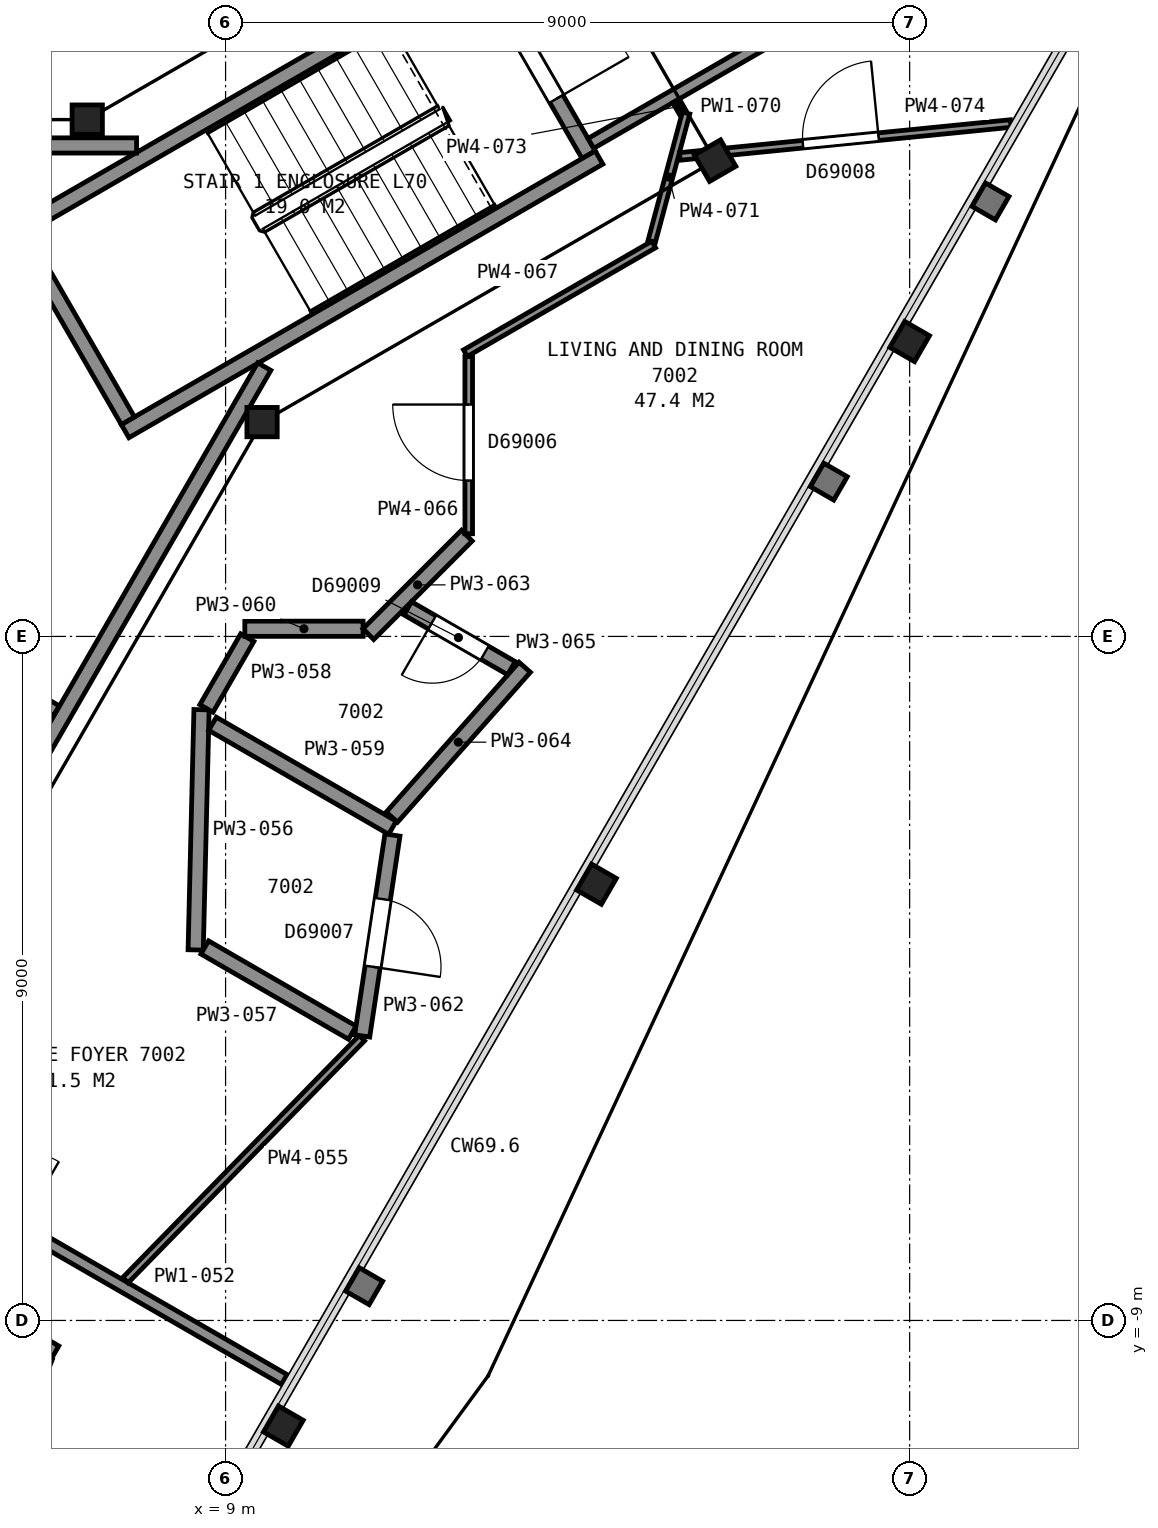
"""IFC4 building model, lengths in metres.
Left out: names, types, materials, properties, quantities, classifications, styles, units other than length and angle.
Written with IfcOpenShell. Run it as: python <this file> out.ifc"""

import sys

from ifc_helpers import new_model, si_unit, direction, frame, frame_2d, origin, origin_2d, place, context, subcontext, project, spatial, rectangle, i_section, extrude, element, fill, save


model = new_model("IFC4")
c1 = context("Model", 3, precision=1e-05, world=origin(), true_north=direction((0.0, 1.0)))
c2 = subcontext(c1, "Body", "Model", "MODEL_VIEW")
j1 = project(units=[si_unit("LENGTHUNIT", "METRE"), si_unit("PLANEANGLEUNIT", "RADIAN")], contexts=[c1])
p1 = place(None, origin())
s1 = spatial("IfcSite", under=j1, at=p1, CompositionType="ELEMENT")
p2 = place(p1, origin())
s2 = spatial("IfcBuilding", under=s1, at=p2, CompositionType="ELEMENT")
p3 = place(p2, frame((0.0, 0.0, 278.8)))
s3 = spatial("IfcBuildingStorey", under=s2, at=p3, CompositionType="ELEMENT", Elevation=278.8)
for number, where, z_axis, x_axis in (
    (1, (9.76, -10.39, 0.0), (0.0, 0.0, 1.0), (-0.5, -0.866, 0.0)),
    (2, (13.88, -3.26, 0.0), (0.0, 0.0, 1.0), (-0.5, -0.866, 0.0)),
    (3, (18.0, 3.88, 0.0), (0.0, 0.0, 1.0), (-0.5, -0.866, 0.0)),
):
    element("IfcColumn", number, at=place(p3, frame(where, z_axis=z_axis, x_axis=x_axis)), inside=s3, PredefinedType="COLUMN", context=c2, shape_type="SweptSolid", body=[
        extrude(i_section(OverallWidth=0.394, OverallDepth=0.376, WebThickness=0.017, FlangeThickness=0.028, FilletRadius=0.015, at=origin_2d()), origin(), (0.0, 0.0, 1.0), 3.7),
    ])
p4 = place(p3, frame((9.48, 2.82, 0.0), z_axis=(0.0, 0.0, 1.0), x_axis=(1.0, 0.0, 0.0)))
e4 = element("IfcColumn", 4, at=p4, inside=s3, PredefinedType="COLUMN", context=c2, shape_type="SweptSolid", body=[
    extrude(i_section(OverallWidth=0.399, OverallDepth=0.386, WebThickness=0.021, FlangeThickness=0.033, FilletRadius=0.015, at=origin_2d()), origin(), (0.0, 0.0, 1.0), 3.7),
])
p5 = place(p3, frame((15.44, 6.26, 0.0), z_axis=(0.0, 0.0, 1.0), x_axis=(0.5, -0.866025403784, 0.0)))
e5 = element("IfcColumn", 5, at=p5, inside=s3, PredefinedType="COLUMN", context=c2, shape_type="SweptSolid", body=[
    extrude(i_section(OverallWidth=0.401, OverallDepth=0.399, WebThickness=0.025, FlangeThickness=0.04, FilletRadius=0.015, at=origin_2d()), origin(), (0.0, 0.0, 1.0), 3.7),
])
p6 = place(p3, frame((7.18, 6.8, 0.0), z_axis=(0.0, 0.0, 1.0), x_axis=(1.0, 0.0, 0.0)))
e6 = element("IfcColumn", 6, at=p6, inside=s3, PredefinedType="COLUMN", context=c2, shape_type="SweptSolid", body=[
    extrude(i_section(OverallWidth=0.399, OverallDepth=0.386, WebThickness=0.021, FlangeThickness=0.033, FilletRadius=0.015, at=origin_2d()), origin(), (0.0, 0.0, 1.0), 3.7),
])
p7 = place(p3, frame((13.777, 6.338, 0.0), z_axis=(0.0, 0.0, 1.0), x_axis=(-0.500049511043, 0.865996816683, 0.0)))
e7 = element("IfcWall", 7, at=p7, inside=s3, PredefinedType="PARTITIONING", context=c2, shape_type="SweptSolid", body=[
    extrude(rectangle(XDim=2.8, YDim=0.2, at=frame_2d((1.4, 0.0))), origin(), (0.0, 0.0, 1.0), 3.45),
])
p8 = place(p7, frame((0.85, 0.0, 0.0)))
e8 = element("IfcOpeningElement", 8, at=p8, cuts=e7, PredefinedType="OPENING", context=c2, shape_type="SweptSolid", body=[
    extrude(rectangle(XDim=1.1, YDim=2.1, at=frame_2d((0.55, 1.05))), frame((0.0, 0.11, 0.0), z_axis=(0.0, -1.0, 0.0), x_axis=(1.0, 0.0, 0.0)), (0.0, 0.0, 1.0), 0.22),
])
for number, where, z_axis, x_axis in (
    (9, (6.178, 5.299, 0.0), (0.0, 0.0, 1.0), (0.866, 0.5, 0.0)),
    (10, (7.678, 2.701, 0.0), (0.0, 0.0, 1.0), (0.866, 0.5, 0.0)),
):
    element("IfcWall", number, at=place(p3, frame(where, z_axis=z_axis, x_axis=x_axis)), inside=s3, PredefinedType="PARTITIONING", context=c2, shape_type="SweptSolid", body=[
        extrude(rectangle(XDim=7.2, YDim=0.2, at=frame_2d((3.6, 0.0))), origin(), (0.0, 0.0, 1.0), 3.45),
    ])
p9 = place(p3, frame((7.715, 2.838, 0.0), z_axis=(0.0, 0.0, 1.0), x_axis=(-0.500049511043, 0.865996816683, 0.0)))
e11 = element("IfcWall", 11, at=p9, inside=s3, PredefinedType="PARTITIONING", context=c2, shape_type="SweptSolid", body=[
    extrude(rectangle(XDim=2.8, YDim=0.2, at=frame_2d((1.4, 0.0))), origin(), (0.0, 0.0, 1.0), 3.45),
])
p10 = place(p3, frame((7.829, 6.46, 0.0), z_axis=(0.0, 0.0, 1.0), x_axis=(-1.0, 0.0, 0.0)))
e12 = element("IfcWall", 12, at=p10, inside=s3, PredefinedType="PARTITIONING", context=c2, shape_type="SweptSolid", body=[
    extrude(rectangle(XDim=15.658, YDim=0.2, at=frame_2d((7.829, 0.0))), origin(), (0.0, 0.0, 1.0), 3.45),
])
p11 = place(p10, frame((12.168, 0.0, 0.0)))
e13 = element("IfcOpeningElement", 13, at=p11, cuts=e12, PredefinedType="OPENING", context=c2, shape_type="SweptSolid", body=[
    extrude(rectangle(XDim=1.2, YDim=2.1, at=frame_2d((0.6, 1.05))), frame((0.0, 0.11, 0.0), z_axis=(0.0, -1.0, 0.0), x_axis=(1.0, 0.0, 0.0)), (0.0, 0.0, 1.0), 0.22),
])
p12 = place(p3, frame((3.828, -6.29, 0.0), z_axis=(0.0, 0.0, 1.0), x_axis=(0.499979739078, 0.866037101117, 0.0)))
e14 = element("IfcWall", 14, at=p12, inside=s3, PredefinedType="PARTITIONING", context=c2, shape_type="SweptSolid", body=[
    extrude(rectangle(XDim=11.363, YDim=0.2, at=frame_2d((5.681, 0.0))), origin(), (0.0, 0.0, 1.0), 3.45),
])
p13 = place(p12, frame((0.55, 0.0, 0.0)))
e15 = element("IfcOpeningElement", 15, at=p13, cuts=e14, PredefinedType="OPENING", context=c2, shape_type="SweptSolid", body=[
    extrude(rectangle(XDim=1.2, YDim=2.1, at=frame_2d((0.6, 1.05))), frame((0.0, 0.11, 0.0), z_axis=(0.0, -1.0, 0.0), x_axis=(1.0, 0.0, 0.0)), (0.0, 0.0, 1.0), 0.22),
])
p14 = place(p3, frame((6.774, -0.978, 0.0), z_axis=(0.0, 0.0, 1.0), x_axis=(-0.866062920605, 0.499935013329, 0.0)))
e16 = element("IfcWall", 16, at=p14, inside=s3, PredefinedType="PARTITIONING", context=c2, shape_type="SweptSolid", body=[
    extrude(rectangle(XDim=2.22, YDim=0.15, at=frame_2d((1.11, 0.0))), origin(), (0.0, 0.0, 1.0), 3.45),
])
p15 = place(p14, frame((0.646, 0.0, 0.0)))
e17 = element("IfcOpeningElement", 17, at=p15, cuts=e16, PredefinedType="OPENING", context=c2, shape_type="SweptSolid", body=[
    extrude(rectangle(XDim=0.9, YDim=2.1, at=frame_2d((0.45, 1.05))), frame((0.0, 0.085, 0.0), z_axis=(0.0, -1.0, 0.0), x_axis=(1.0, 0.0, 0.0)), (0.0, 0.0, 1.0), 0.17),
])
p16 = place(p3, frame((3.498, -7.541, 0.0), z_axis=(0.0, 0.0, 1.0), x_axis=(0.865985624761, -0.500068892961, 0.0)))
e18 = element("IfcWall", 18, at=p16, inside=s3, PredefinedType="PARTITIONING", context=c2, shape_type="SweptSolid", body=[
    extrude(rectangle(XDim=3.762, YDim=0.2, at=frame_2d((1.881, 0.0))), origin(), (0.0, 0.0, 1.0), 2.723),
])
p17 = place(p3, frame((9.772, -9.777, 0.0), z_axis=(0.0, 0.0, 1.0), x_axis=(-0.866083818164, 0.499898809675, 0.0)))
e19 = element("IfcWall", 19, at=p17, inside=s3, PredefinedType="PARTITIONING", context=c2, shape_type="SweptSolid", body=[
    extrude(rectangle(XDim=6.551, YDim=0.15, at=frame_2d((3.275, 0.0))), origin(), (0.0, 0.0, 1.0), 2.723),
])
p18 = place(p17, frame((4.001, 0.0, 0.0)))
e20 = element("IfcOpeningElement", 20, at=p18, cuts=e19, PredefinedType="OPENING", context=c2, shape_type="SweptSolid", body=[
    extrude(rectangle(XDim=1.0, YDim=2.1, at=frame_2d((0.5, 1.05))), frame((0.0, 0.085, 0.0), z_axis=(0.0, -1.0, 0.0), x_axis=(1.0, 0.0, 0.0)), (0.0, 0.0, 1.0), 0.17),
])
p19 = place(p3, frame((5.526, -12.29, 0.0), z_axis=(0.0, 0.0, 1.0), x_axis=(0.364786545928, 0.931091174864, 0.0)))
e21 = element("IfcWall", 21, at=p19, inside=s3, PredefinedType="PARTITIONING", context=c2, shape_type="SweptSolid", body=[
    extrude(rectangle(XDim=3.019, YDim=0.2, at=frame_2d((1.51, 0.0))), origin(), (0.0, 0.0, 1.0), 2.723),
])
p20 = place(p3, frame((7.682, -8.47, 0.0), z_axis=(0.0, 0.0, 1.0), x_axis=(0.698777378461, 0.715339203002, 0.0)))
e22 = element("IfcWall", 22, at=p20, inside=s3, PredefinedType="PARTITIONING", context=c2, shape_type="SweptSolid", body=[
    extrude(rectangle(XDim=4.452, YDim=0.1, at=frame_2d((2.226, 0.0))), origin(), (0.0, 0.0, 1.0), 2.723),
])
p21 = place(p3, frame((8.607, -4.125, 0.0), z_axis=(0.0, 0.0, 1.0), x_axis=(0.024245593124, 0.999706032399, 0.0)))
e23 = element("IfcWall", 23, at=p21, inside=s3, PredefinedType="PARTITIONING", context=c2, shape_type="SweptSolid", body=[
    extrude(rectangle(XDim=3.162, YDim=0.2, at=frame_2d((1.581, 0.0))), origin(), (0.0, 0.0, 1.0), 2.723),
])
p22 = place(p3, frame((8.726, -4.093, 0.0), z_axis=(0.0, 0.0, 1.0), x_axis=(0.866056839033, -0.499945548598, 0.0)))
e24 = element("IfcWall", 24, at=p22, inside=s3, PredefinedType="PARTITIONING", context=c2, shape_type="SweptSolid", body=[
    extrude(rectangle(XDim=2.242, YDim=0.2, at=frame_2d((1.121, 0.0))), origin(), (0.0, 0.0, 1.0), 2.723),
])
p23 = place(p3, frame((8.749, -0.947, 0.0), z_axis=(0.0, 0.0, 1.0), x_axis=(0.499656913366, 0.866223394354, 0.0)))
e25 = element("IfcWall", 25, at=p23, inside=s3, PredefinedType="PARTITIONING", context=c2, shape_type="SweptSolid", body=[
    extrude(rectangle(XDim=1.075, YDim=0.2, at=frame_2d((0.538, 0.0))), origin(), (0.0, 0.0, 1.0), 2.723),
])
p24 = place(p3, frame((8.828, -1.149, 0.0), z_axis=(0.0, 0.0, 1.0), x_axis=(0.865853899269, -0.50029693695, 0.0)))
e26 = element("IfcWall", 26, at=p24, inside=s3, PredefinedType="PARTITIONING", context=c2, shape_type="SweptSolid", body=[
    extrude(rectangle(XDim=2.734, YDim=0.2, at=frame_2d((1.367, 0.0))), origin(), (0.0, 0.0, 1.0), 2.723),
])
p25 = place(p3, frame((9.253, 0.101, 0.0), z_axis=(0.0, 0.0, 1.0), x_axis=(1.0, 0.0, 0.0)))
e27 = element("IfcWall", 27, at=p25, inside=s3, PredefinedType="PARTITIONING", context=c2, shape_type="SweptSolid", body=[
    extrude(rectangle(XDim=1.556, YDim=0.2, at=frame_2d((0.778, 0.0))), origin(), (0.0, 0.0, 1.0), 2.723),
])
p26 = place(p3, frame((10.797, -5.256, 0.0), z_axis=(0.0, 0.0, 1.0), x_axis=(0.148961207986, 0.988843040384, 0.0)))
e28 = element("IfcWall", 28, at=p26, inside=s3, PredefinedType="PARTITIONING", context=c2, shape_type="SweptSolid", body=[
    extrude(rectangle(XDim=2.673, YDim=0.2, at=frame_2d((1.336, 0.0))), origin(), (0.0, 0.0, 1.0), 2.723),
])
p27 = place(p26, frame((0.92, 0.0, 0.0)))
e29 = element("IfcOpeningElement", 29, at=p27, cuts=e28, PredefinedType="OPENING", context=c2, shape_type="SweptSolid", body=[
    extrude(rectangle(XDim=0.9, YDim=2.1, at=frame_2d((0.45, 1.05))), frame((0.0, 0.11, 0.0), z_axis=(0.0, -1.0, 0.0), x_axis=(1.0, 0.0, 0.0)), (0.0, 0.0, 1.0), 0.22),
])
p28 = place(p3, frame((10.878, 0.03, 0.0), z_axis=(0.0, 0.0, 1.0), x_axis=(0.707173379423, 0.707040176677, 0.0)))
e30 = element("IfcWall", 30, at=p28, inside=s3, PredefinedType="PARTITIONING", context=c2, shape_type="SweptSolid", body=[
    extrude(rectangle(XDim=1.833, YDim=0.2, at=frame_2d((0.917, 0.0))), origin(), (0.0, 0.0, 1.0), 2.723),
])
p29 = place(p3, frame((11.188, -2.377, 0.0), z_axis=(0.0, 0.0, 1.0), x_axis=(0.663045631266, 0.748578981043, 0.0)))
e31 = element("IfcWall", 31, at=p29, inside=s3, PredefinedType="PARTITIONING", context=c2, shape_type="SweptSolid", body=[
    extrude(rectangle(XDim=2.635, YDim=0.2, at=frame_2d((1.317, 0.0))), origin(), (0.0, 0.0, 1.0), 2.723),
])
p30 = place(p3, frame((12.761, -0.417, 0.0), z_axis=(0.0, 0.0, 1.0), x_axis=(-0.866030680601, 0.499990860175, 0.0)))
e32 = element("IfcWall", 32, at=p30, inside=s3, PredefinedType="PARTITIONING", context=c2, shape_type="SweptSolid", body=[
    extrude(rectangle(XDim=1.575, YDim=0.2, at=frame_2d((0.787, 0.0))), origin(), (0.0, 0.0, 1.0), 2.723),
])
p31 = place(p30, frame((0.405, 0.0, 0.0)))
e33 = element("IfcOpeningElement", 33, at=p31, cuts=e32, PredefinedType="OPENING", context=c2, shape_type="SweptSolid", body=[
    extrude(rectangle(XDim=0.8, YDim=2.1, at=frame_2d((0.4, 1.05))), frame((0.0, 0.11, 0.0), z_axis=(0.0, -1.0, 0.0), x_axis=(1.0, 0.0, 0.0)), (0.0, 0.0, 1.0), 0.22),
])
p32 = place(p3, frame((12.199, 3.682, 0.0), z_axis=(0.0, 0.0, 1.0), x_axis=(0.0, -1.0, 0.0)))
e34 = element("IfcWall", 34, at=p32, inside=s3, PredefinedType="PARTITIONING", context=c2, shape_type="SweptSolid", body=[
    extrude(rectangle(XDim=2.331, YDim=0.1, at=frame_2d((1.166, 0.0))), origin(), (0.0, 0.0, 1.0), 2.723),
])
p33 = place(p32, frame((0.631, 0.0, 0.0)))
e35 = element("IfcOpeningElement", 35, at=p33, cuts=e34, PredefinedType="OPENING", context=c2, shape_type="SweptSolid", body=[
    extrude(rectangle(XDim=1.0, YDim=2.1, at=frame_2d((0.5, 1.05))), frame((0.0, 0.06, 0.0), z_axis=(0.0, -1.0, 0.0), x_axis=(1.0, 0.0, 0.0)), (0.0, 0.0, 1.0), 0.12),
])
p34 = place(p3, frame((12.156, 3.727, 0.0), z_axis=(0.0, 0.0, 1.0), x_axis=(0.866012137121, 0.500022977831, 0.0)))
e36 = element("IfcWall", 36, at=p34, inside=s3, PredefinedType="PARTITIONING", context=c2, shape_type="SweptSolid", body=[
    extrude(rectangle(XDim=2.86, YDim=0.1, at=frame_2d((1.43, 0.0))), origin(), (0.0, 0.0, 1.0), 2.723),
])
p35 = place(p3, frame((13.806, 6.487, 0.0), z_axis=(0.0, 0.0, 1.0), x_axis=(0.866056369097, 0.49994636267, 0.0)))
e37 = element("IfcWall", 37, at=p35, inside=s3, PredefinedType="PARTITIONING", context=c2, shape_type="SweptSolid", body=[
    extrude(rectangle(XDim=2.8, YDim=0.15, at=frame_2d((1.4, 0.0))), origin(), (0.0, 0.0, 1.0), 2.723),
])
p36 = place(p3, frame((14.607, 5.2, 0.0), z_axis=(0.0, 0.0, 1.0), x_axis=(0.258549793661, 0.965997931777, 0.0)))
e38 = element("IfcWall", 38, at=p36, inside=s3, PredefinedType="PARTITIONING", context=c2, shape_type="SweptSolid", body=[
    extrude(rectangle(XDim=1.747, YDim=0.1, at=frame_2d((0.874, 0.0))), origin(), (0.0, 0.0, 1.0), 2.723),
])
p37 = place(p3, frame((14.927, 7.047, 0.0), z_axis=(0.0, 0.0, 1.0), x_axis=(0.497687197367, -0.867356589631, 0.0)))
e39 = element("IfcWall", 39, at=p37, inside=s3, PredefinedType="PARTITIONING", context=c2, shape_type="SweptSolid", body=[
    extrude(rectangle(XDim=0.17, YDim=0.1, at=frame_2d((0.085, 0.0))), origin(), (0.0, 0.0, 1.0), 2.723),
])
p38 = place(p3, frame((14.976, 6.315, 0.0), z_axis=(0.0, 0.0, 1.0), x_axis=(0.995082940066, 0.09904515329, 0.0)))
e40 = element("IfcWall", 40, at=p38, inside=s3, PredefinedType="PARTITIONING", context=c2, shape_type="SweptSolid", body=[
    extrude(rectangle(XDim=4.375, YDim=0.1, at=frame_2d((2.188, 0.0))), origin(), (0.0, 0.0, 1.0), 2.723),
])
p39 = place(p38, frame((1.628, 0.0, 0.0)))
e41 = element("IfcOpeningElement", 41, at=p39, cuts=e40, PredefinedType="OPENING", context=c2, shape_type="SweptSolid", body=[
    extrude(rectangle(XDim=1.0, YDim=2.1, at=frame_2d((0.5, 1.05))), frame((0.0, 0.06, 0.0), z_axis=(0.0, -1.0, 0.0), x_axis=(1.0, 0.0, 0.0)), (0.0, 0.0, 1.0), 0.12),
])
p40 = place(p8, origin())
e42 = element("IfcDoor", 42, at=p40, inside=s3, OperationType="SINGLE_SWING_LEFT", PredefinedType="DOOR", context=c2, shape_type="SweptSolid", body=[
    extrude(rectangle(XDim=1.1, YDim=2.1, at=frame_2d((0.55, 1.05))), frame((0.0, 0.025, 0.0), z_axis=(0.0, -1.0, 0.0), x_axis=(1.0, 0.0, 0.0)), (0.0, 0.0, 1.0), 0.05),
])
fill(e8, e42)
p41 = place(p27, origin())
e43 = element("IfcDoor", 43, at=p41, inside=s3, OperationType="SINGLE_SWING_LEFT", PredefinedType="DOOR", context=c2, shape_type="SweptSolid", body=[
    extrude(rectangle(XDim=0.9, YDim=2.1, at=frame_2d((0.45, 1.05))), frame((0.0, 0.025, 0.0), z_axis=(0.0, -1.0, 0.0), x_axis=(1.0, 0.0, 0.0)), (0.0, 0.0, 1.0), 0.05),
])
fill(e29, e43)
p42 = place(p31, origin())
e44 = element("IfcDoor", 44, at=p42, inside=s3, OperationType="SINGLE_SWING_RIGHT", PredefinedType="DOOR", context=c2, shape_type="SweptSolid", body=[
    extrude(rectangle(XDim=0.8, YDim=2.1, at=frame_2d((0.4, 1.05))), frame((0.0, 0.025, 0.0), z_axis=(0.0, -1.0, 0.0), x_axis=(1.0, 0.0, 0.0)), (0.0, 0.0, 1.0), 0.05),
])
fill(e33, e44)
p43 = place(p33, origin())
e45 = element("IfcDoor", 45, at=p43, inside=s3, OperationType="SINGLE_SWING_LEFT", PredefinedType="DOOR", context=c2, shape_type="SweptSolid", body=[
    extrude(rectangle(XDim=1.0, YDim=2.1, at=frame_2d((0.5, 1.05))), frame((0.0, 0.025, 0.0), z_axis=(0.0, -1.0, 0.0), x_axis=(1.0, 0.0, 0.0)), (0.0, 0.0, 1.0), 0.05),
])
fill(e35, e45)
p44 = place(p39, origin())
e46 = element("IfcDoor", 46, at=p44, inside=s3, OperationType="SINGLE_SWING_RIGHT", PredefinedType="DOOR", context=c2, shape_type="SweptSolid", body=[
    extrude(rectangle(XDim=1.0, YDim=2.1, at=frame_2d((0.5, 1.05))), frame((0.0, 0.025, 0.0), z_axis=(0.0, -1.0, 0.0), x_axis=(1.0, 0.0, 0.0)), (0.0, 0.0, 1.0), 0.05),
])
fill(e41, e46)
save(model, sys.argv[1])
